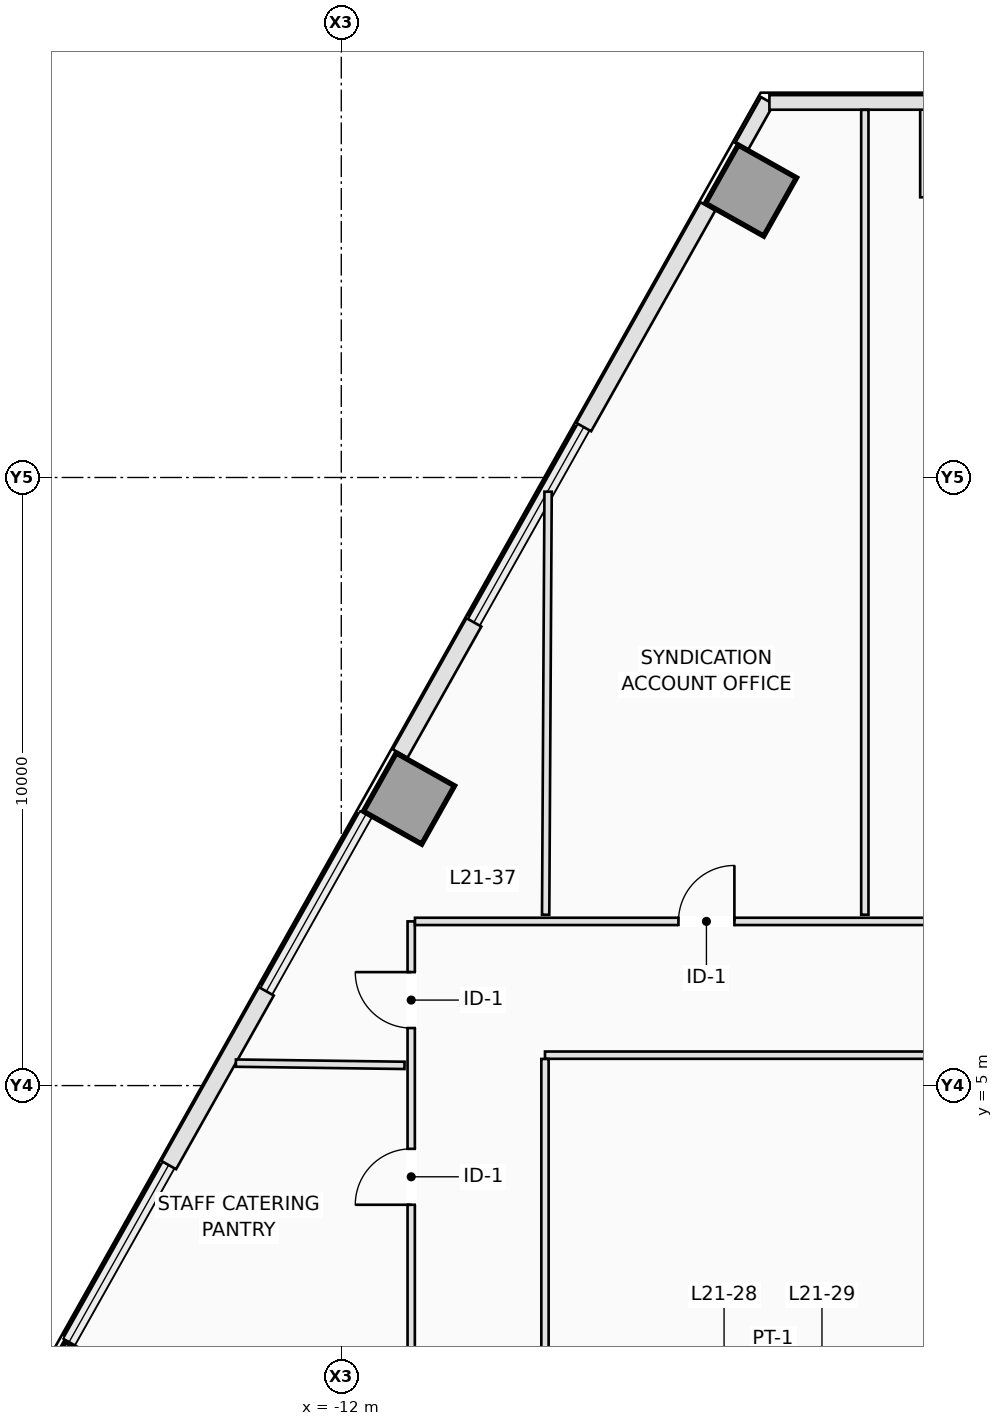
"""IFC4 building model, lengths in metres.
Left out: names, types, materials, properties, quantities, classifications, styles, units other than length and angle.
Written with IfcOpenShell. Run it as: python <this file> out.ifc"""

import sys

from ifc_helpers import new_model, si_unit, direction, frame, frame_2d, origin, origin_2d, place, context, subcontext, project, spatial, rectangle, extrude, element, fill, save


model = new_model("IFC4")
c1 = context("Model", 3, precision=1e-05, world=origin(), true_north=direction((0.0, 1.0)))
c2 = subcontext(c1, "Body", "Model", "MODEL_VIEW")
j1 = project(units=[si_unit("LENGTHUNIT", "METRE"), si_unit("PLANEANGLEUNIT", "RADIAN")], contexts=[c1])
p1 = place(None, origin())
s1 = spatial("IfcSite", under=j1, at=p1, CompositionType="ELEMENT")
p2 = place(p1, origin())
s2 = spatial("IfcBuilding", under=s1, at=p2, CompositionType="ELEMENT")
p3 = place(p2, frame((0.0, 0.0, 80.1)))
s3 = spatial("IfcBuildingStorey", under=s2, at=p3, CompositionType="ELEMENT", Elevation=80.1)
for number, where, z_axis, x_axis in (
    (1, (-5.262, 19.719, 0.0), (0.0, 0.0, 1.0), (-0.872, 0.49, 0.0)),
    (2, (-10.887, 9.72, 0.0), (0.0, 0.0, 1.0), (-0.872, 0.49, 0.0)),
    (3, (-16.33, 0.043, 0.0), (0.0, 0.0, 1.0), (-0.872, 0.49, 0.0)),
):
    element("IfcColumn", number, at=place(p3, frame(where, z_axis=z_axis, x_axis=x_axis)), inside=s3, PredefinedType="COLUMN", context=c2, shape_type="SweptSolid", body=[
        extrude(rectangle(XDim=1.1, YDim=1.1, at=origin_2d()), origin(), (0.0, 0.0, 1.0), 3.5),
    ])
p4 = place(p3, frame((-5.417, 20.443, 0.0), z_axis=(0.0, 0.0, 1.0), x_axis=(0.490355003566, 0.871522788272, 0.0)))
e4 = element("IfcWall", 4, at=p4, inside=s3, PredefinedType="STANDARD", context=c2, shape_type="SweptSolid", body=[
    extrude(rectangle(XDim=0.865, YDim=0.24, at=frame_2d((0.433, 0.0))), origin(), (0.0, 0.0, 1.0), 3.25),
])
p5 = place(p3, frame((-11.032, 10.461, 0.0), z_axis=(0.0, 0.0, 1.0), x_axis=(0.490303410255, 0.871551814807, 0.0)))
e5 = element("IfcWall", 5, at=p5, inside=s3, PredefinedType="STANDARD", context=c2, shape_type="SweptSolid", body=[
    extrude(rectangle(XDim=2.474, YDim=0.28, at=frame_2d((1.237, 0.0))), origin(), (0.0, 0.0, 1.0), 3.25),
])
p6 = place(p3, frame((-8.013, 15.829, 0.0), z_axis=(0.0, 0.0, 1.0), x_axis=(0.490280725514, 0.87156457603, 0.0)))
e6 = element("IfcWall", 6, at=p6, inside=s3, PredefinedType="STANDARD", context=c2, shape_type="SweptSolid", body=[
    extrude(rectangle(XDim=4.164, YDim=0.28, at=frame_2d((2.082, 0.0))), origin(), (0.0, 0.0, 1.0), 3.25),
])
p7 = place(p3, frame((-14.839, 3.694, 0.0), z_axis=(0.0, 0.0, 1.0), x_axis=(0.490310760781, 0.871547679626, 0.0)))
e7 = element("IfcWall", 7, at=p7, inside=s3, PredefinedType="STANDARD", context=c2, shape_type="SweptSolid", body=[
    extrude(rectangle(XDim=3.277, YDim=0.28, at=frame_2d((1.638, 0.0))), origin(), (0.0, 0.0, 1.0), 3.25),
])
p8 = place(p3, frame((-2.36, 19.608, 0.0), z_axis=(0.0, 0.0, 1.0), x_axis=(0.0, 1.0, 0.0)))
e8 = element("IfcWall", 8, at=p8, inside=s3, PredefinedType="STANDARD", context=c2, shape_type="SweptSolid", body=[
    extrude(rectangle(XDim=1.56, YDim=0.24, at=frame_2d((0.78, 0.0))), origin(), (0.0, 0.0, 1.0), 3.25),
])
p9 = place(p3, frame((-2.4, 21.168, 0.0), z_axis=(0.0, 0.0, 1.0), x_axis=(-1.0, 0.0, 0.0)))
e9 = element("IfcWall", 9, at=p9, inside=s3, PredefinedType="STANDARD", context=c2, shape_type="SweptSolid", body=[
    extrude(rectangle(XDim=2.56, YDim=0.24, at=frame_2d((1.28, 0.0))), origin(), (0.0, 0.0, 1.0), 3.25),
])
p10 = place(p3, frame((-10.85, -2.338, 0.0), z_axis=(0.0, 0.0, 1.0), x_axis=(0.0, 1.0, 0.0)))
e10 = element("IfcWall", 10, at=p10, inside=s3, PredefinedType="PARTITIONING", context=c2, shape_type="SweptSolid", body=[
    extrude(rectangle(XDim=10.038, YDim=0.12, at=frame_2d((5.019, 0.0))), origin(), (0.0, 0.0, 1.0), 3.25),
])
p11 = place(p10, frame((8.284, 0.0, 0.0)))
e11 = element("IfcOpeningElement", 11, at=p11, cuts=e10, PredefinedType="OPENING", context=c2, shape_type="SweptSolid", body=[
    extrude(rectangle(XDim=0.92, YDim=2.12, at=frame_2d((0.46, 1.06))), frame((0.0, 0.07, 0.0), z_axis=(0.0, -1.0, 0.0), x_axis=(1.0, 0.0, 0.0)), (0.0, 0.0, 1.0), 0.14),
])
p12 = place(p10, frame((5.378, 0.0, 0.0)))
e12 = element("IfcOpeningElement", 12, at=p12, cuts=e10, PredefinedType="OPENING", context=c2, shape_type="SweptSolid", body=[
    extrude(rectangle(XDim=0.92, YDim=2.12, at=frame_2d((0.46, 1.06))), frame((0.0, 0.07, 0.0), z_axis=(0.0, -1.0, 0.0), x_axis=(1.0, 0.0, 0.0)), (0.0, 0.0, 1.0), 0.14),
])
p13 = place(p3, frame((-10.788, 7.7, 0.0), z_axis=(0.0, 0.0, 1.0), x_axis=(1.0, 0.0, 0.0)))
e13 = element("IfcWall", 13, at=p13, inside=s3, PredefinedType="PARTITIONING", context=c2, shape_type="SweptSolid", body=[
    extrude(rectangle(XDim=21.638, YDim=0.12, at=frame_2d((10.819, 0.0))), origin(), (0.0, 0.0, 1.0), 2.891),
])
p14 = place(p13, frame((13.84, 0.0, 0.0)))
e14 = element("IfcOpeningElement", 14, at=p14, cuts=e13, PredefinedType="OPENING", context=c2, shape_type="SweptSolid", body=[
    extrude(rectangle(XDim=0.92, YDim=2.12, at=frame_2d((0.46, 1.06))), frame((0.0, 0.07, 0.0), z_axis=(0.0, -1.0, 0.0), x_axis=(1.0, 0.0, 0.0)), (0.0, 0.0, 1.0), 0.14),
])
p15 = place(p13, frame((9.665, 0.0, 0.0)))
e15 = element("IfcOpeningElement", 15, at=p15, cuts=e13, PredefinedType="OPENING", context=c2, shape_type="SweptSolid", body=[
    extrude(rectangle(XDim=0.92, YDim=2.12, at=frame_2d((0.46, 1.06))), frame((0.0, 0.07, 0.0), z_axis=(0.0, -1.0, 0.0), x_axis=(1.0, 0.0, 0.0)), (0.0, 0.0, 1.0), 0.14),
])
p16 = place(p13, frame((4.333, 0.0, 0.0)))
e16 = element("IfcOpeningElement", 16, at=p16, cuts=e13, PredefinedType="OPENING", context=c2, shape_type="SweptSolid", body=[
    extrude(rectangle(XDim=0.92, YDim=2.12, at=frame_2d((0.46, 1.06))), frame((0.0, 0.07, 0.0), z_axis=(0.0, -1.0, 0.0), x_axis=(1.0, 0.0, 0.0)), (0.0, 0.0, 1.0), 0.14),
])
p17 = place(p13, frame((18.124, 0.0, 0.0)))
e17 = element("IfcOpeningElement", 17, at=p17, cuts=e13, PredefinedType="OPENING", context=c2, shape_type="SweptSolid", body=[
    extrude(rectangle(XDim=0.92, YDim=2.12, at=frame_2d((0.46, 1.06))), frame((0.0, 0.07, 0.0), z_axis=(0.0, -1.0, 0.0), x_axis=(1.0, 0.0, 0.0)), (0.0, 0.0, 1.0), 0.14),
])
p18 = place(p3, frame((8.588, 5.5, 0.0), z_axis=(0.0, 0.0, 1.0), x_axis=(-1.0, 0.0, 0.0)))
e18 = element("IfcWall", 18, at=p18, inside=s3, PredefinedType="PARTITIONING", context=c2, shape_type="SweptSolid", body=[
    extrude(rectangle(XDim=17.238, YDim=0.12, at=frame_2d((8.619, 0.0))), origin(), (0.0, 0.0, 1.0), 3.25),
])
p19 = place(p3, frame((-8.65, 5.438, 0.0), z_axis=(0.0, 0.0, 1.0), x_axis=(0.0, -1.0, 0.0)))
e19 = element("IfcWall", 19, at=p19, inside=s3, PredefinedType="PARTITIONING", context=c2, shape_type="SweptSolid", body=[
    extrude(rectangle(XDim=7.776, YDim=0.12, at=frame_2d((3.888, 0.0))), origin(), (0.0, 0.0, 1.0), 3.25),
])
p20 = place(p3, frame((-3.39, 7.81, 0.0), z_axis=(0.0, 0.0, 1.0), x_axis=(0.0, 1.0, 0.0)))
e20 = element("IfcWall", 20, at=p20, inside=s3, PredefinedType="PARTITIONING", context=c2, shape_type="SweptSolid", body=[
    extrude(rectangle(XDim=13.236, YDim=0.12, at=frame_2d((6.618, 0.0))), origin(), (0.0, 0.0, 1.0), 3.25),
])
p21 = place(p3, frame((-8.639, 7.81, 0.0), z_axis=(0.0, 0.0, 1.0), x_axis=(0.005790798915, 0.999983233183, 0.0)))
e21 = element("IfcWall", 21, at=p21, inside=s3, PredefinedType="PARTITIONING", context=c2, shape_type="SweptSolid", body=[
    extrude(rectangle(XDim=6.956, YDim=0.12, at=frame_2d((3.478, 0.0))), origin(), (0.0, 0.0, 1.0), 3.25),
])
p22 = place(p3, frame((-10.96, 5.332, 0.0), z_axis=(0.0, 0.0, 1.0), x_axis=(-0.999910480291, 0.013380261731, 0.0)))
e22 = element("IfcWall", 22, at=p22, inside=s3, PredefinedType="PARTITIONING", context=c2, shape_type="SweptSolid", body=[
    extrude(rectangle(XDim=2.773, YDim=0.12, at=frame_2d((1.387, 0.0))), origin(), (0.0, 0.0, 1.0), 3.25),
])
p23 = place(p16, origin())
e23 = element("IfcDoor", 23, at=p23, inside=s3, OperationType="SINGLE_SWING_RIGHT", PredefinedType="DOOR", context=c2, shape_type="SweptSolid", body=[
    extrude(rectangle(XDim=0.92, YDim=2.12, at=frame_2d((0.46, 1.06))), frame((0.0, 0.025, 0.0), z_axis=(0.0, -1.0, 0.0), x_axis=(1.0, 0.0, 0.0)), (0.0, 0.0, 1.0), 0.05),
])
fill(e16, e23)
p24 = place(p11, origin())
e24 = element("IfcDoor", 24, at=p24, inside=s3, OperationType="SINGLE_SWING_RIGHT", PredefinedType="DOOR", context=c2, shape_type="SweptSolid", body=[
    extrude(rectangle(XDim=0.92, YDim=2.12, at=frame_2d((0.46, 1.06))), frame((0.0, 0.025, 0.0), z_axis=(0.0, -1.0, 0.0), x_axis=(1.0, 0.0, 0.0)), (0.0, 0.0, 1.0), 0.05),
])
fill(e11, e24)
p25 = place(p12, origin())
e25 = element("IfcDoor", 25, at=p25, inside=s3, OperationType="SINGLE_SWING_LEFT", PredefinedType="DOOR", context=c2, shape_type="SweptSolid", body=[
    extrude(rectangle(XDim=0.92, YDim=2.12, at=frame_2d((0.46, 1.06))), frame((0.0, 0.025, 0.0), z_axis=(0.0, -1.0, 0.0), x_axis=(1.0, 0.0, 0.0)), (0.0, 0.0, 1.0), 0.05),
])
fill(e12, e25)
save(model, sys.argv[1])
